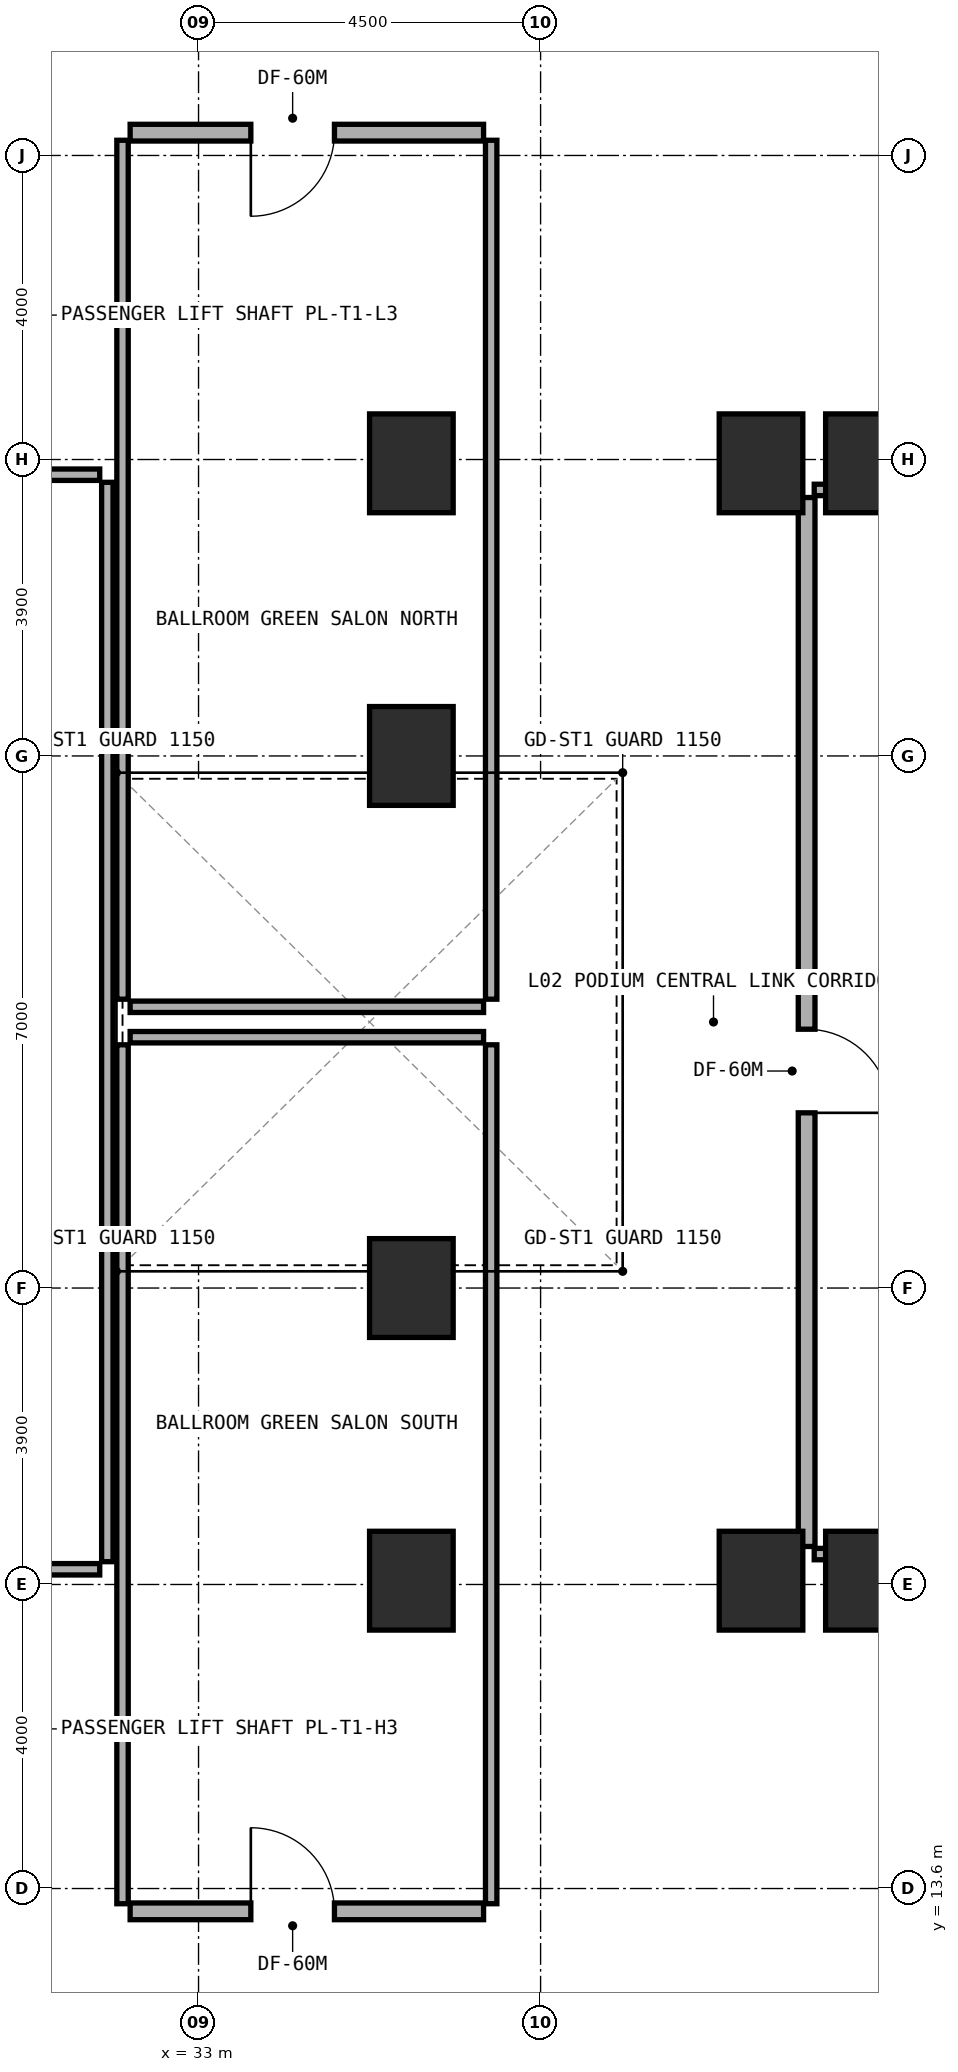
"""IFC4 building model, lengths in metres.
Left out: names, types, materials, properties, quantities, classifications, styles, units other than length and angle.
Written with IfcOpenShell. Run it as: python <this file> out.ifc"""

import sys

from ifc_helpers import new_model, si_unit, direction, frame, frame_2d, origin, origin_2d, place, context, subcontext, project, spatial, rectangle, extrude, element, fill, save


model = new_model("IFC4")
c1 = context("Model", 3, precision=1e-05, world=origin(), true_north=direction((0.0, 1.0)))
c2 = subcontext(c1, "Body", "Model", "MODEL_VIEW")
j1 = project(units=[si_unit("LENGTHUNIT", "METRE"), si_unit("PLANEANGLEUNIT", "RADIAN")], contexts=[c1])
p1 = place(None, origin())
s1 = spatial("IfcSite", under=j1, at=p1, CompositionType="ELEMENT")
p2 = place(p1, origin())
s2 = spatial("IfcBuilding", under=s1, at=p2, CompositionType="ELEMENT")
p3 = place(p2, frame((0.0, 0.0, 10.2)))
s3 = spatial("IfcBuildingStorey", under=s2, at=p3, CompositionType="ELEMENT", Elevation=10.2)
for number, where, z_axis, x_axis in (
    (1, (35.8, 21.5, 0.0), (0.0, 0.0, 1.0), (1.0, 0.0, 0.0)),
    (2, (35.8, 28.5, 0.0), (0.0, 0.0, 1.0), (1.0, 0.0, 0.0)),
    (3, (35.8, 17.65, 0.0), (0.0, 0.0, 1.0), (1.0, 0.0, 0.0)),
    (4, (35.8, 32.35, 0.0), (0.0, 0.0, 1.0), (1.0, 0.0, 0.0)),
    (5, (40.4, 17.65, 0.0), (0.0, 0.0, 1.0), (1.0, 0.0, 0.0)),
    (6, (40.4, 32.35, 0.0), (0.0, 0.0, 1.0), (1.0, 0.0, 0.0)),
    (7, (41.8, 17.65, 0.0), (0.0, 0.0, 1.0), (1.0, 0.0, 0.0)),
    (8, (41.8, 32.35, 0.0), (0.0, 0.0, 1.0), (1.0, 0.0, 0.0)),
):
    element("IfcColumn", number, at=place(p3, frame(where, z_axis=z_axis, x_axis=x_axis)), inside=s3, PredefinedType="COLUMN", context=c2, shape_type="SweptSolid", body=[
        extrude(rectangle(XDim=1.1, YDim=1.3, at=origin_2d()), origin(), (0.0, 0.0, 1.0), 4.8),
    ])
p4 = place(p3, frame((31.8, 17.9, 0.0), z_axis=(0.0, 0.0, 1.0), x_axis=(0.0, 1.0, 0.0)))
e9 = element("IfcWall", 9, at=p4, inside=s3, PredefinedType="PARTITIONING", context=c2, shape_type="SweptSolid", body=[
    extrude(rectangle(XDim=14.2, YDim=0.15, at=frame_2d((7.1, 0.0))), origin(), (0.0, 0.0, 1.0), 3.425),
])
for number, where, z_axis, x_axis in (
    (10, (11.9, 17.8, 0.0), (0.0, 0.0, 1.0), (1.0, 0.0, 0.0)),
    (11, (11.9, 32.2, 0.0), (0.0, 0.0, 1.0), (1.0, 0.0, 0.0)),
):
    element("IfcWall", number, at=place(p3, frame(where, z_axis=z_axis, x_axis=x_axis)), inside=s3, PredefinedType="PARTITIONING", context=c2, shape_type="SweptSolid", body=[
        extrude(rectangle(XDim=19.8, YDim=0.15, at=frame_2d((9.9, 0.0))), origin(), (0.0, 0.0, 1.0), 3.525),
    ])
for number, where, z_axis, x_axis in (
    (12, (41.1, 18.0, 0.0), (0.0, 0.0, 1.0), (1.0, 0.0, 0.0)),
    (13, (41.1, 32.0, 0.0), (0.0, 0.0, 1.0), (1.0, 0.0, 0.0)),
):
    element("IfcWall", number, at=place(p3, frame(where, z_axis=z_axis, x_axis=x_axis)), inside=s3, PredefinedType="PARTITIONING", context=c2, shape_type="SweptSolid", body=[
        extrude(rectangle(XDim=16.6, YDim=0.15, at=frame_2d((8.3, 0.0))), origin(), (0.0, 0.0, 1.0), 3.725),
    ])
p5 = place(p3, frame((41.0, 18.1, 0.0), z_axis=(0.0, 0.0, 1.0), x_axis=(0.0, 1.0, 0.0)))
e14 = element("IfcWall", 14, at=p5, inside=s3, PredefinedType="SOLIDWALL", context=c2, shape_type="SweptSolid", body=[
    extrude(rectangle(XDim=13.8, YDim=0.22, at=frame_2d((6.9, 0.0))), origin(), (0.0, 0.0, 1.0), 4.45),
])
p6 = place(p5, frame((5.705, 0.0, 0.0)))
e15 = element("IfcOpeningElement", 15, at=p6, cuts=e14, PredefinedType="OPENING", context=c2, shape_type="SweptSolid", body=[
    extrude(rectangle(XDim=1.1, YDim=2.1, at=frame_2d((0.55, 1.05))), frame((0.0, 0.12, 0.0), z_axis=(0.0, -1.0, 0.0), x_axis=(1.0, 0.0, 0.0)), (0.0, 0.0, 1.0), 0.24),
])
p7 = place(p3, frame((32.0, 13.4, 0.0), z_axis=(0.0, 0.0, 1.0), x_axis=(0.0, 1.0, 0.0)))
e16 = element("IfcWall", 16, at=p7, inside=s3, PredefinedType="PARTITIONING", context=c2, shape_type="SweptSolid", body=[
    extrude(rectangle(XDim=11.3, YDim=0.15, at=frame_2d((5.65, 0.0))), origin(), (0.0, 0.0, 1.0), 3.425),
])
p8 = place(p3, frame((36.85, 13.4, 0.0), z_axis=(0.0, 0.0, 1.0), x_axis=(0.0, 1.0, 0.0)))
e17 = element("IfcWall", 17, at=p8, inside=s3, PredefinedType="PARTITIONING", context=c2, shape_type="SweptSolid", body=[
    extrude(rectangle(XDim=11.3, YDim=0.15, at=frame_2d((5.65, 0.0))), origin(), (0.0, 0.0, 1.0), 3.525),
])
p9 = place(p3, frame((32.1, 24.8, 0.0), z_axis=(0.0, 0.0, 1.0), x_axis=(1.0, 0.0, 0.0)))
e18 = element("IfcWall", 18, at=p9, inside=s3, PredefinedType="PARTITIONING", context=c2, shape_type="SweptSolid", body=[
    extrude(rectangle(XDim=4.65, YDim=0.15, at=frame_2d((2.325, 0.0))), origin(), (0.0, 0.0, 1.0), 3.975),
])
p10 = place(p3, frame((32.1, 13.3, 0.0), z_axis=(0.0, 0.0, 1.0), x_axis=(1.0, 0.0, 0.0)))
e19 = element("IfcWall", 19, at=p10, inside=s3, PredefinedType="SOLIDWALL", context=c2, shape_type="SweptSolid", body=[
    extrude(rectangle(XDim=4.65, YDim=0.22, at=frame_2d((2.325, 0.0))), origin(), (0.0, 0.0, 1.0), 3.975),
])
p11 = place(p10, frame((1.588, 0.0, 0.0)))
e20 = element("IfcOpeningElement", 20, at=p11, cuts=e19, PredefinedType="OPENING", context=c2, shape_type="SweptSolid", body=[
    extrude(rectangle(XDim=1.1, YDim=2.1, at=frame_2d((0.55, 1.05))), frame((0.0, 0.12, 0.0), z_axis=(0.0, -1.0, 0.0), x_axis=(1.0, 0.0, 0.0)), (0.0, 0.0, 1.0), 0.24),
])
for number, where, z_axis, x_axis in (
    (21, (32.0, 25.3, 0.0), (0.0, 0.0, 1.0), (0.0, 1.0, 0.0)),
    (22, (36.85, 25.3, 0.0), (0.0, 0.0, 1.0), (0.0, 1.0, 0.0)),
):
    element("IfcWall", number, at=place(p3, frame(where, z_axis=z_axis, x_axis=x_axis)), inside=s3, PredefinedType="PARTITIONING", context=c2, shape_type="SweptSolid", body=[
        extrude(rectangle(XDim=11.3, YDim=0.15, at=frame_2d((5.65, 0.0))), origin(), (0.0, 0.0, 1.0), 3.525),
    ])
p12 = place(p3, frame((32.1, 25.2, 0.0), z_axis=(0.0, 0.0, 1.0), x_axis=(1.0, 0.0, 0.0)))
e23 = element("IfcWall", 23, at=p12, inside=s3, PredefinedType="PARTITIONING", context=c2, shape_type="SweptSolid", body=[
    extrude(rectangle(XDim=4.65, YDim=0.15, at=frame_2d((2.325, 0.0))), origin(), (0.0, 0.0, 1.0), 3.975),
])
p13 = place(p3, frame((32.1, 36.7, 0.0), z_axis=(0.0, 0.0, 1.0), x_axis=(1.0, 0.0, 0.0)))
e24 = element("IfcWall", 24, at=p13, inside=s3, PredefinedType="SOLIDWALL", context=c2, shape_type="SweptSolid", body=[
    extrude(rectangle(XDim=4.65, YDim=0.22, at=frame_2d((2.325, 0.0))), origin(), (0.0, 0.0, 1.0), 3.975),
])
p14 = place(p13, frame((1.588, 0.0, 0.0)))
e25 = element("IfcOpeningElement", 25, at=p14, cuts=e24, PredefinedType="OPENING", context=c2, shape_type="SweptSolid", body=[
    extrude(rectangle(XDim=1.1, YDim=2.1, at=frame_2d((0.55, 1.05))), frame((0.0, 0.12, 0.0), z_axis=(0.0, -1.0, 0.0), x_axis=(1.0, 0.0, 0.0)), (0.0, 0.0, 1.0), 0.24),
])
p15 = place(p6, frame((1.1, 0.0, 0.0), z_axis=(0.0, 0.0, 1.0), x_axis=(-1.0, 0.0, 0.0)))
e26 = element("IfcDoor", 26, at=p15, inside=s3, OperationType="SINGLE_SWING_RIGHT", PredefinedType="DOOR", context=c2, shape_type="SweptSolid", body=[
    extrude(rectangle(XDim=1.1, YDim=2.1, at=frame_2d((0.55, 1.05))), frame((0.0, 0.025, 0.0), z_axis=(0.0, -1.0, 0.0), x_axis=(1.0, 0.0, 0.0)), (0.0, 0.0, 1.0), 0.05),
])
fill(e15, e26)
p16 = place(p11, origin())
e27 = element("IfcDoor", 27, at=p16, inside=s3, OperationType="SINGLE_SWING_LEFT", PredefinedType="DOOR", context=c2, shape_type="SweptSolid", body=[
    extrude(rectangle(XDim=1.1, YDim=2.1, at=frame_2d((0.55, 1.05))), frame((0.0, 0.025, 0.0), z_axis=(0.0, -1.0, 0.0), x_axis=(1.0, 0.0, 0.0)), (0.0, 0.0, 1.0), 0.05),
])
fill(e20, e27)
p17 = place(p14, frame((1.1, 0.0, 0.0), z_axis=(0.0, 0.0, 1.0), x_axis=(-1.0, 0.0, 0.0)))
e28 = element("IfcDoor", 28, at=p17, inside=s3, OperationType="SINGLE_SWING_RIGHT", PredefinedType="DOOR", context=c2, shape_type="SweptSolid", body=[
    extrude(rectangle(XDim=1.1, YDim=2.1, at=frame_2d((0.55, 1.05))), frame((0.0, 0.025, 0.0), z_axis=(0.0, -1.0, 0.0), x_axis=(1.0, 0.0, 0.0)), (0.0, 0.0, 1.0), 0.05),
])
fill(e25, e28)
save(model, sys.argv[1])
